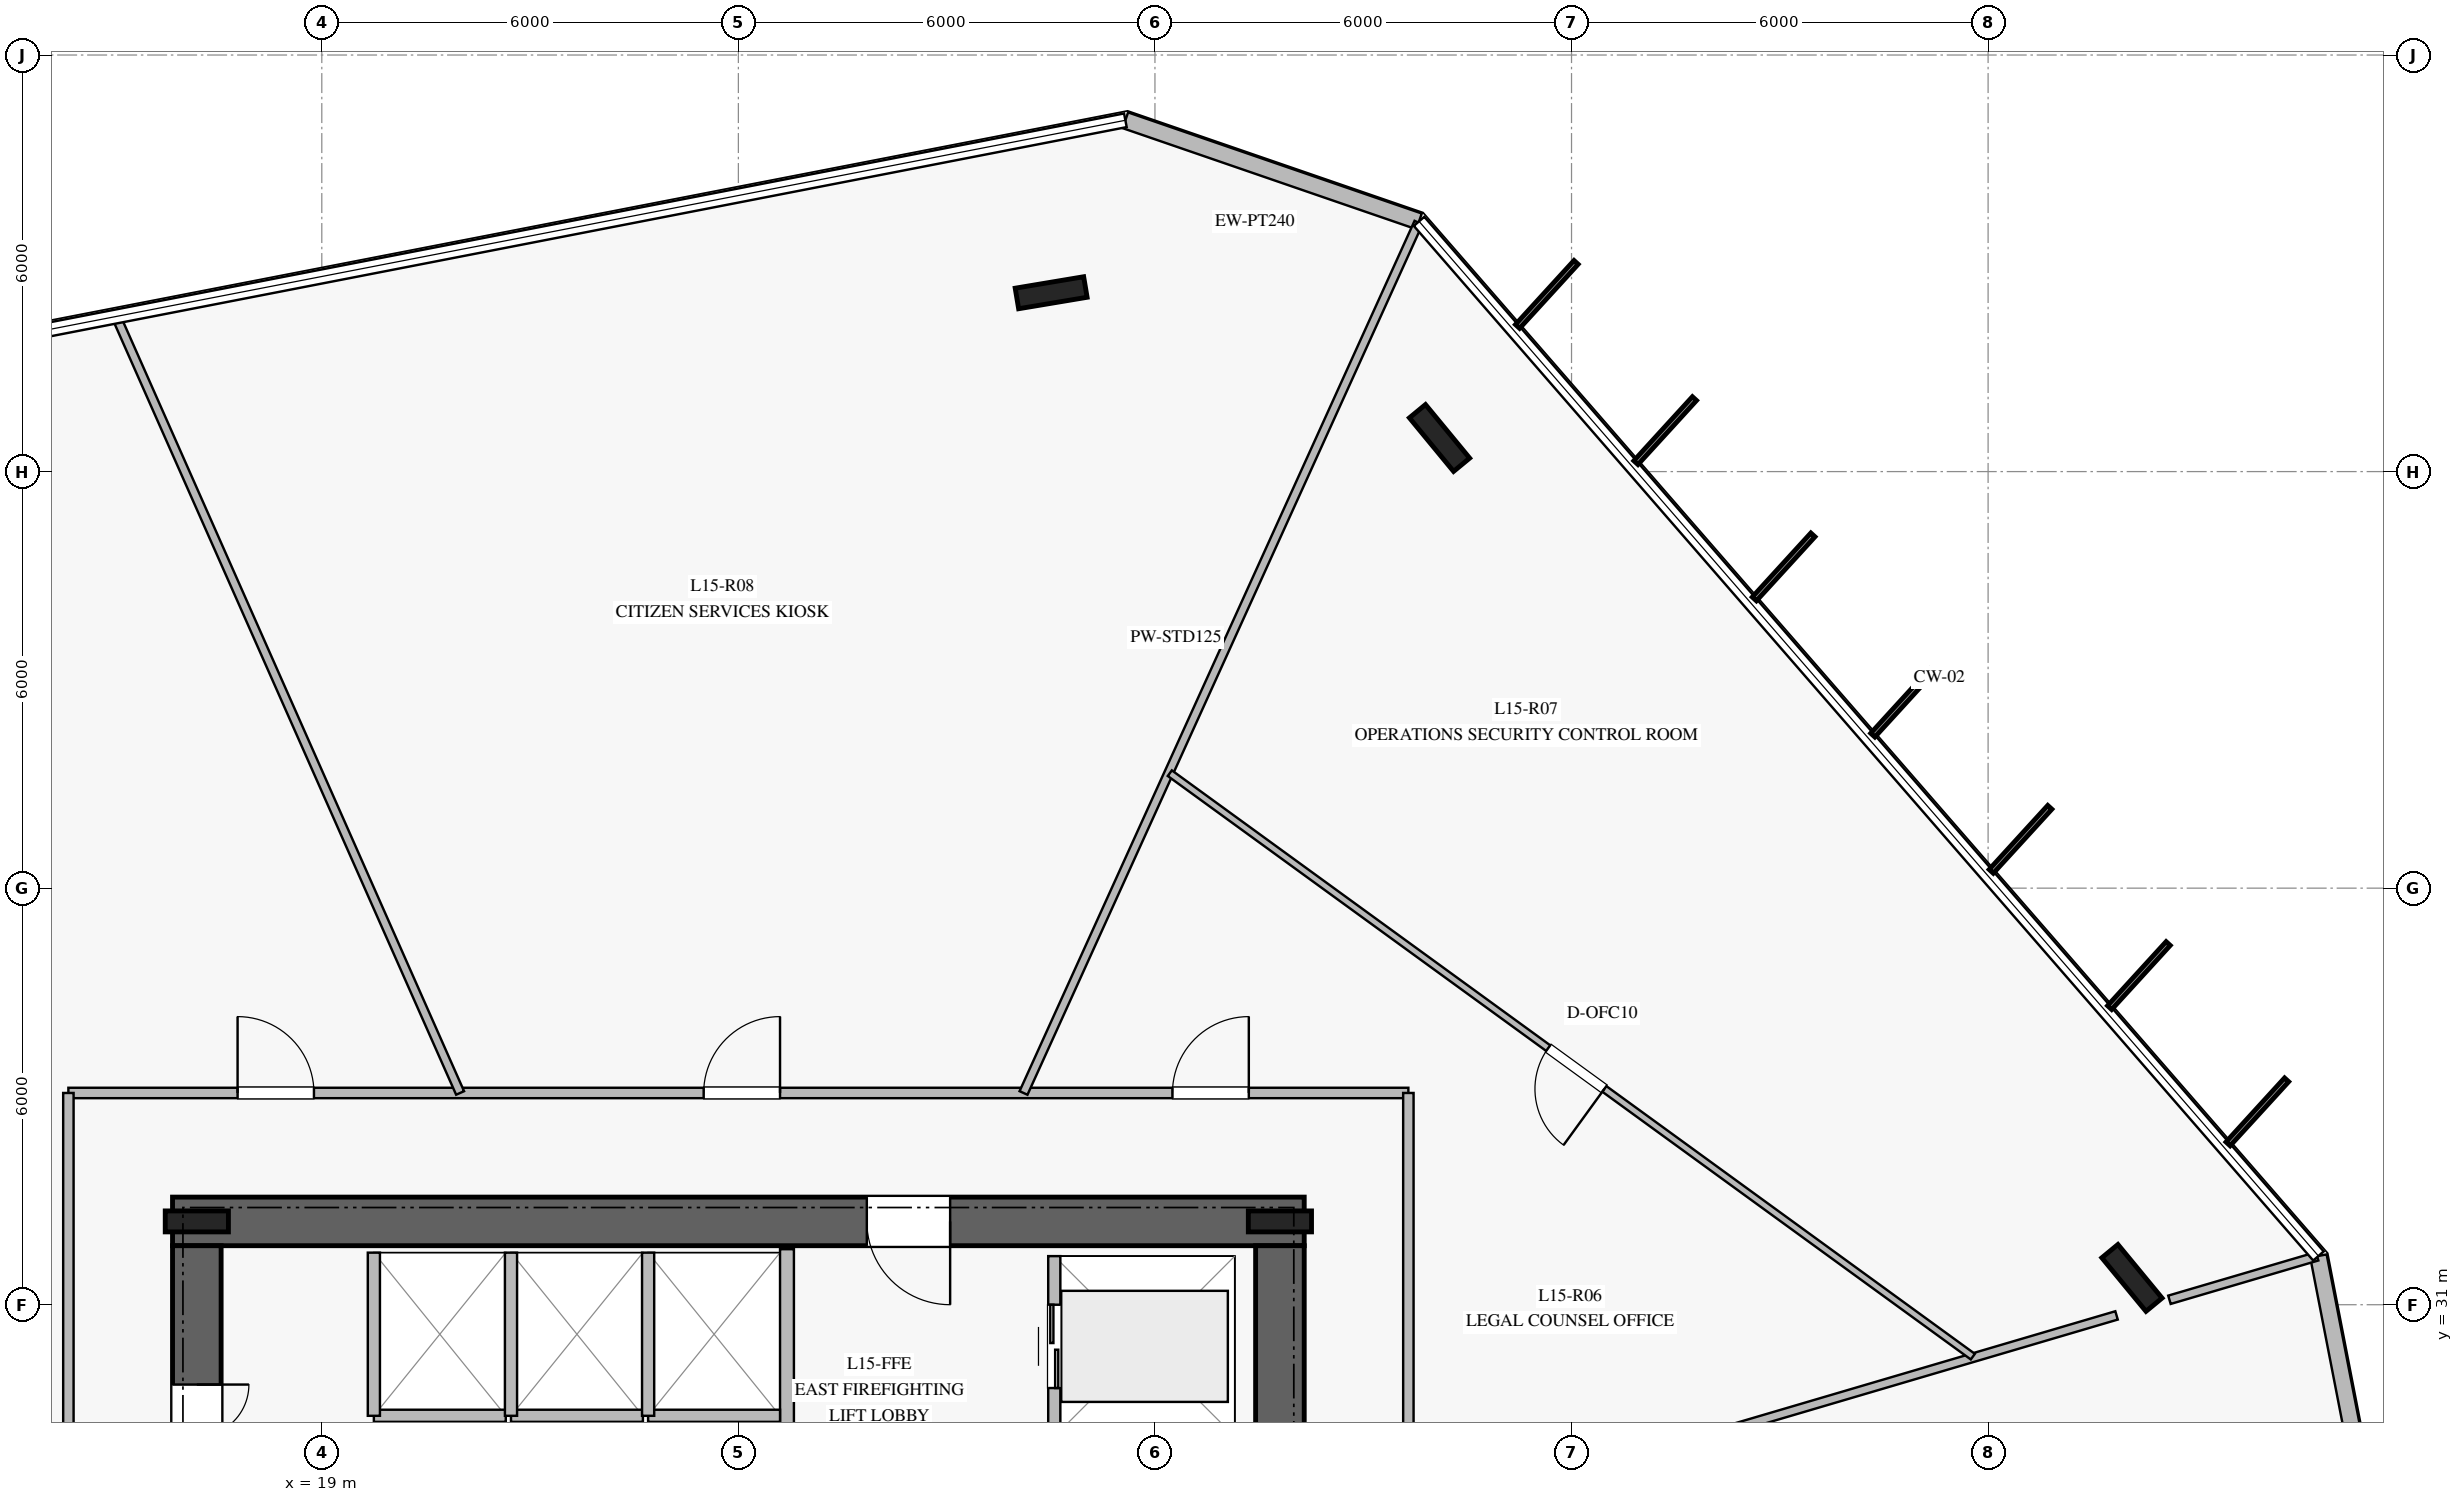
"""IFC4 building model, lengths in metres.
Left out: names, types, materials, properties, quantities, classifications, styles, units other than length and angle.
Written with IfcOpenShell. Run it as: python <this file> out.ifc"""

import sys

from ifc_helpers import new_model, si_unit, direction, frame, frame_2d, origin, origin_2d, place, context, subcontext, project, spatial, rectangle, i_section, extrude, element, fill, save


model = new_model("IFC4")
c1 = context("Model", 3, precision=1e-05, world=origin(), true_north=direction((0.0, 1.0)))
c2 = subcontext(c1, "Body", "Model", "MODEL_VIEW")
j1 = project(units=[si_unit("LENGTHUNIT", "METRE"), si_unit("PLANEANGLEUNIT", "RADIAN")], contexts=[c1])
p1 = place(None, origin())
s1 = spatial("IfcSite", under=j1, at=p1, CompositionType="ELEMENT")
p2 = place(p1, origin())
s2 = spatial("IfcBuilding", under=s1, at=p2, CompositionType="ELEMENT")
p3 = place(p2, frame((0.0, 0.0, 64.0)))
s3 = spatial("IfcBuildingStorey", under=s2, at=p3, CompositionType="ELEMENT", Elevation=64.0)
p4 = place(p3, frame((33.15, 32.2, 0.0), z_axis=(0.0, 0.0, 1.0), x_axis=(-1.0, 0.0, 0.0)))
e1 = element("IfcWall", 1, at=p4, inside=s3, PredefinedType="SHEAR", context=c2, shape_type="SweptSolid", body=[
    extrude(rectangle(XDim=16.3, YDim=0.7, at=frame_2d((8.15, 0.0))), origin(), (0.0, 0.0, 1.0), 3.76),
])
p5 = place(p4, frame((5.1, 0.0, 0.0)))
e2 = element("IfcOpeningElement", 2, at=p5, cuts=e1, PredefinedType="OPENING", context=c2, shape_type="SweptSolid", body=[
    extrude(rectangle(XDim=1.2, YDim=2.25, at=frame_2d((0.6, 1.125))), frame((0.0, 0.36, 0.0), z_axis=(0.0, -1.0, 0.0), x_axis=(1.0, 0.0, 0.0)), (0.0, 0.0, 1.0), 0.72),
])
p6 = place(p3, frame((17.2, 31.85, 0.0), z_axis=(0.0, 0.0, 1.0), x_axis=(0.0, -1.0, 0.0)))
e3 = element("IfcWall", 3, at=p6, inside=s3, PredefinedType="SHEAR", context=c2, shape_type="SweptSolid", body=[
    extrude(rectangle(XDim=13.7, YDim=0.7, at=frame_2d((6.85, 0.0))), origin(), (0.0, 0.0, 1.0), 3.76),
])
p7 = place(p6, frame((2.0, 0.0, 0.0)))
e4 = element("IfcOpeningElement", 4, at=p7, cuts=e3, PredefinedType="OPENING", context=c2, shape_type="SweptSolid", body=[
    extrude(rectangle(XDim=1.5, YDim=2.2, at=frame_2d((0.75, 1.1))), frame((0.0, 0.36, 0.0), z_axis=(0.0, -1.0, 0.0), x_axis=(1.0, 0.0, 0.0)), (0.0, 0.0, 1.0), 0.72),
])
p8 = place(p3, frame((32.8, 18.15, 0.0), z_axis=(0.0, 0.0, 1.0), x_axis=(0.0, 1.0, 0.0)))
e5 = element("IfcWall", 5, at=p8, inside=s3, PredefinedType="SHEAR", context=c2, shape_type="SweptSolid", body=[
    extrude(rectangle(XDim=13.7, YDim=0.7, at=frame_2d((6.85, 0.0))), origin(), (0.0, 0.0, 1.0), 3.76),
])
for number, where, z_axis, x_axis in (
    (6, (32.8, 32.2, 0.0), (0.0, 0.0, 1.0), (1.0, 0.0, 0.0)),
    (7, (17.2, 32.2, 0.0), (0.0, 0.0, 1.0), (1.0, 0.0, 0.0)),
):
    element("IfcColumn", number, at=place(p3, frame(where, z_axis=z_axis, x_axis=x_axis)), inside=s3, PredefinedType="COLUMN", context=c2, shape_type="SweptSolid", body=[
        extrude(i_section(OverallWidth=0.302, OverallDepth=0.91, WebThickness=0.021, FlangeThickness=0.04, at=origin_2d()), origin(), (0.0, 0.0, 1.0), 4.0),
    ])
for number, where, z_axis, x_axis in (
    (8, (45.072, 31.386, 0.0), (0.0, 0.0, 1.0), (-0.636, 0.772, 0.0)),
    (9, (35.099, 43.484, 0.0), (0.0, 0.0, 1.0), (-0.636, 0.772, 0.0)),
    (10, (29.505, 45.576, 0.0), (0.0, 0.0, 1.0), (0.986, 0.165, 0.0)),
):
    element("IfcColumn", number, at=place(p3, frame(where, z_axis=z_axis, x_axis=x_axis)), inside=s3, PredefinedType="COLUMN", context=c2, shape_type="SweptSolid", body=[
        extrude(i_section(OverallWidth=0.3, OverallDepth=1.0, WebThickness=0.019, FlangeThickness=0.036, at=origin_2d()), origin(), (0.0, 0.0, 1.0), 4.0),
    ])
p9 = place(p3, frame((34.804, 46.604, 0.0), z_axis=(0.0, 0.0, 1.0), x_axis=(-0.945549150447, 0.325479345104, 0.0)))
e11 = element("IfcWall", 11, at=p9, inside=s3, PredefinedType="STANDARD", context=c2, shape_type="SweptSolid", body=[
    extrude(rectangle(XDim=4.474, YDim=0.24, at=frame_2d((2.237, 0.0))), origin(), (0.0, 0.0, 1.0), 3.76),
])
p10 = place(p3, frame((48.612, 27.311, 0.0), z_axis=(0.0, 0.0, 1.0), x_axis=(-0.190917867073, 0.981606014668, 0.0)))
e12 = element("IfcWall", 12, at=p10, inside=s3, PredefinedType="STANDARD", context=c2, shape_type="SweptSolid", body=[
    extrude(rectangle(XDim=4.473, YDim=0.24, at=frame_2d((2.237, 0.0))), origin(), (0.0, 0.0, 1.0), 3.76),
])
p11 = place(p3, frame((25.7, 26.65, 0.0), z_axis=(0.0, 0.0, 1.0), x_axis=(0.0, 1.0, 0.0)))
e13 = element("IfcWall", 13, at=p11, inside=s3, PredefinedType="PARTITIONING", context=c2, shape_type="SweptSolid", body=[
    extrude(rectangle(XDim=5.15, YDim=0.2, at=frame_2d((2.575, 0.0))), origin(), (0.0, 0.0, 1.0), 3.76),
])
p12 = place(p3, frame((19.75, 29.4, 0.0), z_axis=(0.0, 0.0, 1.0), x_axis=(1.0, 0.0, 0.0)))
e14 = element("IfcWall", 14, at=p12, inside=s3, PredefinedType="PARTITIONING", context=c2, shape_type="SweptSolid", body=[
    extrude(rectangle(XDim=1.9, YDim=0.175, at=frame_2d((0.95, 0.0))), origin(), (0.0, 0.0, 1.0), 3.76),
])
p13 = place(p3, frame((19.75, 29.4, 0.0), z_axis=(0.0, 0.0, 1.0), x_axis=(0.0, 1.0, 0.0)))
e15 = element("IfcWall", 15, at=p13, inside=s3, PredefinedType="PARTITIONING", context=c2, shape_type="SweptSolid", body=[
    extrude(rectangle(XDim=2.35, YDim=0.175, at=frame_2d((1.175, 0.0))), origin(), (0.0, 0.0, 1.0), 3.76),
])
p14 = place(p3, frame((21.725, 29.4, 0.0), z_axis=(0.0, 0.0, 1.0), x_axis=(1.0, 0.0, 0.0)))
e16 = element("IfcWall", 16, at=p14, inside=s3, PredefinedType="PARTITIONING", context=c2, shape_type="SweptSolid", body=[
    extrude(rectangle(XDim=1.9, YDim=0.175, at=frame_2d((0.95, 0.0))), origin(), (0.0, 0.0, 1.0), 3.76),
])
p15 = place(p3, frame((21.725, 29.4, 0.0), z_axis=(0.0, 0.0, 1.0), x_axis=(0.0, 1.0, 0.0)))
e17 = element("IfcWall", 17, at=p15, inside=s3, PredefinedType="PARTITIONING", context=c2, shape_type="SweptSolid", body=[
    extrude(rectangle(XDim=2.35, YDim=0.175, at=frame_2d((1.175, 0.0))), origin(), (0.0, 0.0, 1.0), 3.76),
])
p16 = place(p3, frame((23.7, 29.4, 0.0), z_axis=(0.0, 0.0, 1.0), x_axis=(1.0, 0.0, 0.0)))
e18 = element("IfcWall", 18, at=p16, inside=s3, PredefinedType="PARTITIONING", context=c2, shape_type="SweptSolid", body=[
    extrude(rectangle(XDim=1.9, YDim=0.175, at=frame_2d((0.95, 0.0))), origin(), (0.0, 0.0, 1.0), 3.76),
])
p17 = place(p3, frame((23.7, 29.4, 0.0), z_axis=(0.0, 0.0, 1.0), x_axis=(0.0, 1.0, 0.0)))
e19 = element("IfcWall", 19, at=p17, inside=s3, PredefinedType="PARTITIONING", context=c2, shape_type="SweptSolid", body=[
    extrude(rectangle(XDim=2.35, YDim=0.175, at=frame_2d((1.175, 0.0))), origin(), (0.0, 0.0, 1.0), 3.76),
])
p18 = place(p3, frame((29.55, 29.1, 0.0), z_axis=(0.0, 0.0, 1.0), x_axis=(0.0, 1.0, 0.0)))
e20 = element("IfcWall", 20, at=p18, inside=s3, PredefinedType="PARTITIONING", context=c2, shape_type="SweptSolid", body=[
    extrude(rectangle(XDim=2.6, YDim=0.175, at=frame_2d((1.3, 0.0))), origin(), (0.0, 0.0, 1.0), 3.76),
])
p19 = place(p18, frame((0.7, 0.0, 0.0)))
e21 = element("IfcOpeningElement", 21, at=p19, cuts=e20, PredefinedType="OPENING", context=c2, shape_type="SweptSolid", body=[
    extrude(rectangle(XDim=1.2, YDim=2.2, at=frame_2d((0.6, 1.1))), frame((0.0, 0.098, 0.0), z_axis=(0.0, -1.0, 0.0), x_axis=(1.0, 0.0, 0.0)), (0.0, 0.0, 1.0), 0.195),
])
p20 = place(p3, frame((15.35, 34.05, 0.0), z_axis=(0.0, 0.0, 1.0), x_axis=(1.0, 0.0, 0.0)))
e22 = element("IfcWall", 22, at=p20, inside=s3, PredefinedType="PARTITIONING", context=c2, shape_type="SweptSolid", body=[
    extrude(rectangle(XDim=19.3, YDim=0.15, at=frame_2d((9.65, 0.0))), origin(), (0.0, 0.0, 1.0), 3.21),
])
p21 = place(p20, frame((15.902, 0.0, 0.0)))
e23 = element("IfcOpeningElement", 23, at=p21, cuts=e22, PredefinedType="OPENING", context=c2, shape_type="SweptSolid", body=[
    extrude(rectangle(XDim=1.1, YDim=2.2, at=frame_2d((0.55, 1.1))), frame((0.0, 0.085, 0.0), z_axis=(0.0, -1.0, 0.0), x_axis=(1.0, 0.0, 0.0)), (0.0, 0.0, 1.0), 0.17),
])
p22 = place(p20, frame((9.15, 0.0, 0.0)))
e24 = element("IfcOpeningElement", 24, at=p22, cuts=e22, PredefinedType="OPENING", context=c2, shape_type="SweptSolid", body=[
    extrude(rectangle(XDim=1.1, YDim=2.2, at=frame_2d((0.55, 1.1))), frame((0.0, 0.085, 0.0), z_axis=(0.0, -1.0, 0.0), x_axis=(1.0, 0.0, 0.0)), (0.0, 0.0, 1.0), 0.17),
])
p23 = place(p20, frame((2.437, 0.0, 0.0)))
e25 = element("IfcOpeningElement", 25, at=p23, cuts=e22, PredefinedType="OPENING", context=c2, shape_type="SweptSolid", body=[
    extrude(rectangle(XDim=1.1, YDim=2.2, at=frame_2d((0.55, 1.1))), frame((0.0, 0.085, 0.0), z_axis=(0.0, -1.0, 0.0), x_axis=(1.0, 0.0, 0.0)), (0.0, 0.0, 1.0), 0.17),
])
p24 = place(p3, frame((34.65, 34.05, 0.0), z_axis=(0.0, 0.0, 1.0), x_axis=(0.0, -1.0, 0.0)))
e26 = element("IfcWall", 26, at=p24, inside=s3, PredefinedType="PARTITIONING", context=c2, shape_type="SweptSolid", body=[
    extrude(rectangle(XDim=18.1, YDim=0.15, at=frame_2d((9.05, 0.0))), origin(), (0.0, 0.0, 1.0), 3.21),
])
p25 = place(p24, frame((15.31, 0.0, 0.0)))
e27 = element("IfcOpeningElement", 27, at=p25, cuts=e26, PredefinedType="OPENING", context=c2, shape_type="SweptSolid", body=[
    extrude(rectangle(XDim=1.1, YDim=2.2, at=frame_2d((0.55, 1.1))), frame((0.0, 0.085, 0.0), z_axis=(0.0, -1.0, 0.0), x_axis=(1.0, 0.0, 0.0)), (0.0, 0.0, 1.0), 0.17),
])
p26 = place(p24, frame((9.532, 0.0, 0.0)))
e28 = element("IfcOpeningElement", 28, at=p26, cuts=e26, PredefinedType="OPENING", context=c2, shape_type="SweptSolid", body=[
    extrude(rectangle(XDim=1.1, YDim=2.2, at=frame_2d((0.55, 1.1))), frame((0.0, 0.085, 0.0), z_axis=(0.0, -1.0, 0.0), x_axis=(1.0, 0.0, 0.0)), (0.0, 0.0, 1.0), 0.17),
])
p27 = place(p3, frame((15.35, 15.95, 0.0), z_axis=(0.0, 0.0, 1.0), x_axis=(0.0, 1.0, 0.0)))
e29 = element("IfcWall", 29, at=p27, inside=s3, PredefinedType="PARTITIONING", context=c2, shape_type="SweptSolid", body=[
    extrude(rectangle(XDim=18.1, YDim=0.15, at=frame_2d((9.05, 0.0))), origin(), (0.0, 0.0, 1.0), 3.21),
])
p28 = place(p27, frame((5.15, 0.0, 0.0)))
e30 = element("IfcOpeningElement", 30, at=p28, cuts=e29, PredefinedType="OPENING", context=c2, shape_type="SweptSolid", body=[
    extrude(rectangle(XDim=1.1, YDim=2.2, at=frame_2d((0.55, 1.1))), frame((0.0, 0.085, 0.0), z_axis=(0.0, -1.0, 0.0), x_axis=(1.0, 0.0, 0.0)), (0.0, 0.0, 1.0), 0.17),
])
p29 = place(p3, frame((29.107, 34.05, 0.0), z_axis=(0.0, 0.0, 1.0), x_axis=(0.413251031514, 0.910617145101, 0.0)))
e31 = element("IfcWall", 31, at=p29, inside=s3, PredefinedType="PARTITIONING", context=c2, shape_type="SweptSolid", body=[
    extrude(rectangle(XDim=13.766, YDim=0.125, at=frame_2d((6.883, 0.0))), origin(), (0.0, 0.0, 1.0), 3.06),
])
p30 = place(p3, frame((20.992, 34.05, 0.0), z_axis=(0.0, 0.0, 1.0), x_axis=(-0.405038361355, 0.914299691475, 0.0)))
e32 = element("IfcWall", 32, at=p30, inside=s3, PredefinedType="PARTITIONING", context=c2, shape_type="SweptSolid", body=[
    extrude(rectangle(XDim=12.214, YDim=0.125, at=frame_2d((6.107, 0.0))), origin(), (0.0, 0.0, 1.0), 3.06),
])
p31 = place(p3, frame((34.65, 27.842, 0.0), z_axis=(0.0, 0.0, 1.0), x_axis=(0.959267461701, 0.282499445878, 0.0)))
e33 = element("IfcWall", 33, at=p31, inside=s3, PredefinedType="PARTITIONING", context=c2, shape_type="SweptSolid", body=[
    extrude(rectangle(XDim=10.633, YDim=0.125, at=frame_2d((5.317, 0.0))), origin(), (0.0, 0.0, 1.0), 3.06),
])
p32 = place(p3, frame((45.612, 31.071, 0.0), z_axis=(0.0, 0.0, 1.0), x_axis=(0.95931639147, 0.282333244689, 0.0)))
e34 = element("IfcWall", 34, at=p32, inside=s3, PredefinedType="PARTITIONING", context=c2, shape_type="SweptSolid", body=[
    extrude(rectangle(XDim=2.217, YDim=0.125, at=frame_2d((1.108, 0.0))), origin(), (0.0, 0.0, 1.0), 3.76),
])
p33 = place(p3, frame((42.78, 30.252, 0.0), z_axis=(0.0, 0.0, 1.0), x_axis=(-0.808986344623, 0.587827435744, 0.0)))
e35 = element("IfcWall", 35, at=p33, inside=s3, PredefinedType="MOVABLE", context=c2, shape_type="SweptSolid", body=[
    extrude(rectangle(XDim=14.297, YDim=0.1, at=frame_2d((7.148, 0.0))), origin(), (0.0, 0.0, 1.0), 3.21),
])
p34 = place(p33, frame((6.56, 0.0, 0.0)))
e36 = element("IfcOpeningElement", 36, at=p34, cuts=e35, PredefinedType="OPENING", context=c2, shape_type="SweptSolid", body=[
    extrude(rectangle(XDim=1.0, YDim=2.15, at=frame_2d((0.5, 1.075))), frame((0.0, 0.06, 0.0), z_axis=(0.0, -1.0, 0.0), x_axis=(1.0, 0.0, 0.0)), (0.0, 0.0, 1.0), 0.12),
])
p35 = place(p5, origin())
e37 = element("IfcDoor", 37, at=p35, inside=s3, OperationType="SINGLE_SWING_LEFT", PredefinedType="DOOR", context=c2, shape_type="SweptSolid", body=[
    extrude(rectangle(XDim=1.2, YDim=2.25, at=frame_2d((0.6, 1.125))), frame((0.0, 0.025, 0.0), z_axis=(0.0, -1.0, 0.0), x_axis=(1.0, 0.0, 0.0)), (0.0, 0.0, 1.0), 0.05),
])
fill(e2, e37)
p36 = place(p7, origin())
e38 = element("IfcDoor", 38, at=p36, inside=s3, OperationType="DOUBLE_DOOR_SINGLE_SWING", PredefinedType="DOOR", context=c2, shape_type="SweptSolid", body=[
    extrude(rectangle(XDim=1.5, YDim=2.2, at=frame_2d((0.75, 1.1))), frame((0.0, 0.025, 0.0), z_axis=(0.0, -1.0, 0.0), x_axis=(1.0, 0.0, 0.0)), (0.0, 0.0, 1.0), 0.05),
])
fill(e4, e38)
p37 = place(p19, origin())
e39 = element("IfcDoor", 39, at=p37, inside=s3, OperationType="DOUBLE_DOOR_SLIDING", PredefinedType="DOOR", context=c2, shape_type="SweptSolid", body=[
    extrude(rectangle(XDim=1.2, YDim=2.2, at=frame_2d((0.6, 1.1))), frame((0.0, 0.025, 0.0), z_axis=(0.0, -1.0, 0.0), x_axis=(1.0, 0.0, 0.0)), (0.0, 0.0, 1.0), 0.05),
])
fill(e21, e39)
p38 = place(p21, origin())
e40 = element("IfcDoor", 40, at=p38, inside=s3, OperationType="SINGLE_SWING_RIGHT", PredefinedType="DOOR", context=c2, shape_type="SweptSolid", body=[
    extrude(rectangle(XDim=1.1, YDim=2.2, at=frame_2d((0.55, 1.1))), frame((0.0, 0.025, 0.0), z_axis=(0.0, -1.0, 0.0), x_axis=(1.0, 0.0, 0.0)), (0.0, 0.0, 1.0), 0.05),
])
fill(e23, e40)
p39 = place(p34, origin())
e41 = element("IfcDoor", 41, at=p39, inside=s3, OperationType="SINGLE_SWING_LEFT", PredefinedType="DOOR", context=c2, shape_type="SweptSolid", body=[
    extrude(rectangle(XDim=1.0, YDim=2.15, at=frame_2d((0.5, 1.075))), frame((0.0, 0.025, 0.0), z_axis=(0.0, -1.0, 0.0), x_axis=(1.0, 0.0, 0.0)), (0.0, 0.0, 1.0), 0.05),
])
fill(e36, e41)
p40 = place(p22, origin())
e42 = element("IfcDoor", 42, at=p40, inside=s3, OperationType="SINGLE_SWING_RIGHT", PredefinedType="DOOR", context=c2, shape_type="SweptSolid", body=[
    extrude(rectangle(XDim=1.1, YDim=2.2, at=frame_2d((0.55, 1.1))), frame((0.0, 0.025, 0.0), z_axis=(0.0, -1.0, 0.0), x_axis=(1.0, 0.0, 0.0)), (0.0, 0.0, 1.0), 0.05),
])
fill(e24, e42)
p41 = place(p23, origin())
e43 = element("IfcDoor", 43, at=p41, inside=s3, OperationType="SINGLE_SWING_LEFT", PredefinedType="DOOR", context=c2, shape_type="SweptSolid", body=[
    extrude(rectangle(XDim=1.1, YDim=2.2, at=frame_2d((0.55, 1.1))), frame((0.0, 0.025, 0.0), z_axis=(0.0, -1.0, 0.0), x_axis=(1.0, 0.0, 0.0)), (0.0, 0.0, 1.0), 0.05),
])
fill(e25, e43)
save(model, sys.argv[1])
